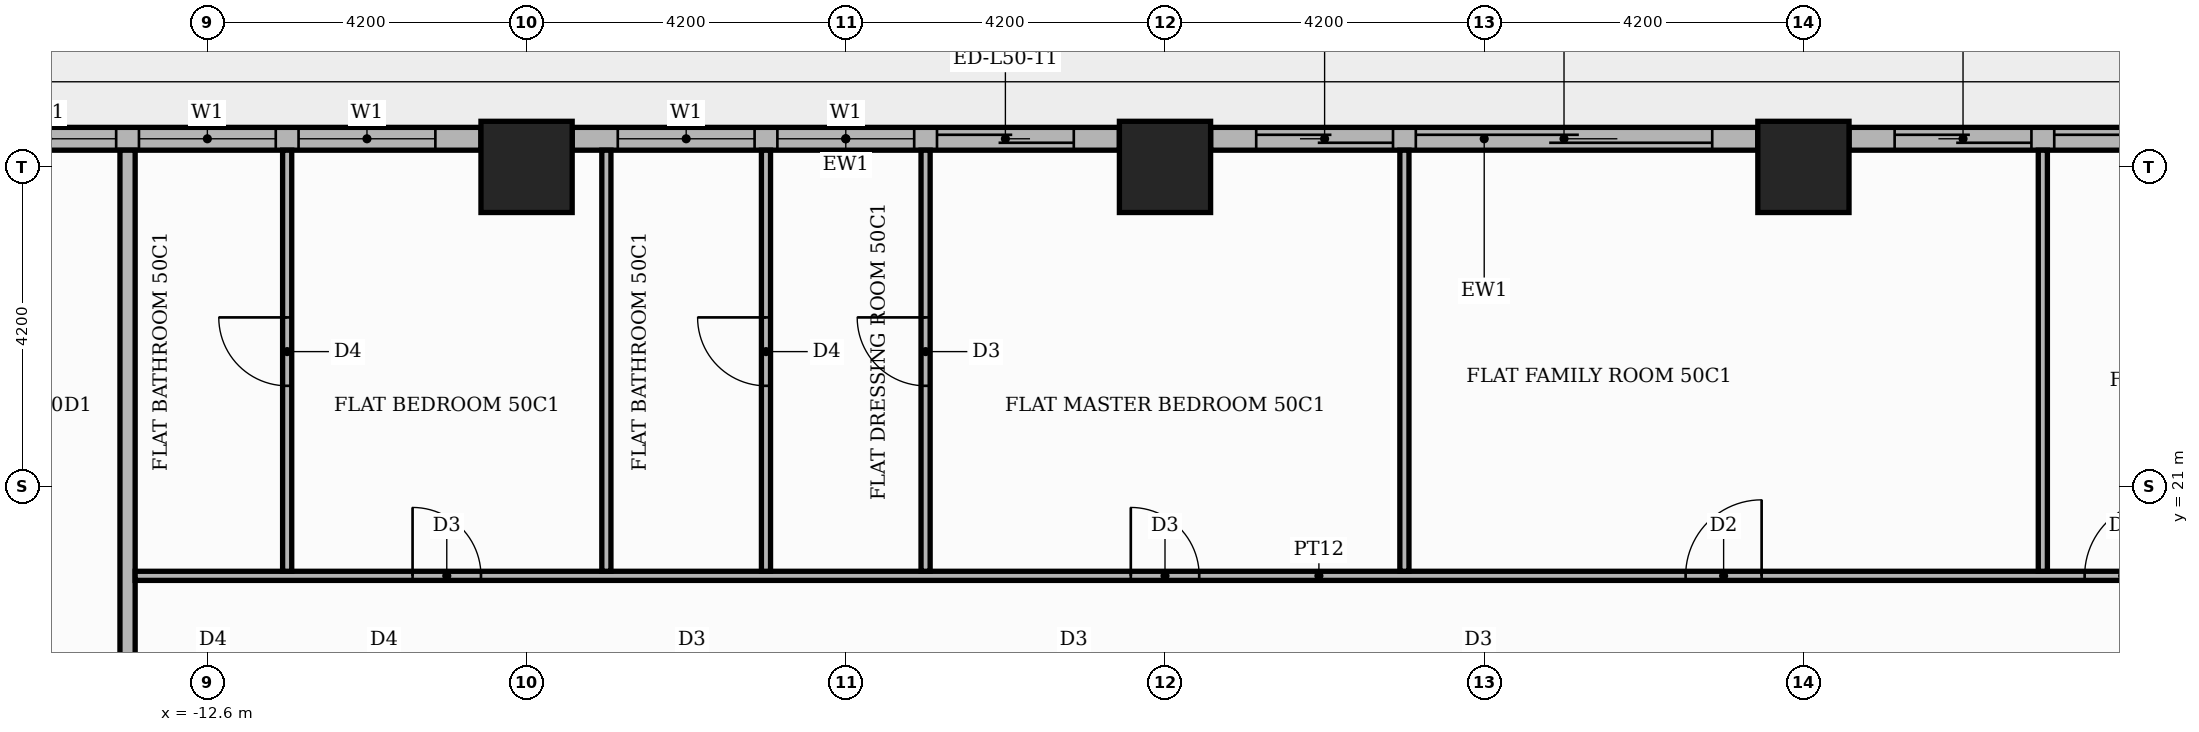
"""IFC4 building model, lengths in metres.
Left out: names, types, materials, properties, quantities, classifications, styles, units other than length and angle.
Written with IfcOpenShell. Run it as: python <this file> out.ifc"""

import sys

from ifc_helpers import new_model, si_unit, direction, frame, frame_2d, origin, origin_2d, place, context, subcontext, project, spatial, rectangle, extrude, element, fill, save


model = new_model("IFC4")
c1 = context("Model", 3, precision=1e-05, world=origin(), true_north=direction((0.0, 1.0)))
c2 = subcontext(c1, "Body", "Model", "MODEL_VIEW")
j1 = project(units=[si_unit("LENGTHUNIT", "METRE"), si_unit("PLANEANGLEUNIT", "RADIAN")], contexts=[c1])
p1 = place(None, origin())
s1 = spatial("IfcSite", under=j1, at=p1, CompositionType="ELEMENT")
p2 = place(p1, origin())
s2 = spatial("IfcBuilding", under=s1, at=p2, CompositionType="ELEMENT")
p3 = place(p2, frame((0.0, 0.0, 211.8)))
s3 = spatial("IfcBuildingStorey", under=s2, at=p3, CompositionType="ELEMENT", Elevation=211.8)
for number, where, z_axis, x_axis in (
    (1, (0.0, 25.2, 0.0), (0.0, 0.0, 1.0), (1.0, 0.0, 0.0)),
    (2, (-8.4, 25.2, 0.0), (0.0, 0.0, 1.0), (1.0, 0.0, 0.0)),
    (3, (8.4, 25.2, 0.0), (0.0, 0.0, 1.0), (1.0, 0.0, 0.0)),
):
    element("IfcColumn", number, at=place(p3, frame(where, z_axis=z_axis, x_axis=x_axis)), inside=s3, PredefinedType="COLUMN", context=c2, shape_type="SweptSolid", body=[
        extrude(rectangle(XDim=1.2, YDim=1.2, at=origin_2d()), origin(), (0.0, 0.0, 1.0), 3.9),
    ])
p4 = place(p3, frame((16.2, 25.57, 0.0), z_axis=(0.0, 0.0, 1.0), x_axis=(-1.0, 0.0, 0.0)))
e4 = element("IfcWall", 4, at=p4, inside=s3, PredefinedType="STANDARD", context=c2, shape_type="SweptSolid", body=[
    extrude(rectangle(XDim=7.2, YDim=0.3, at=frame_2d((3.6, 0.0))), origin(), (0.0, 0.0, 1.0), 3.48),
])
p5 = place(p4, frame((0.6, 0.0, 0.0)))
e5 = element("IfcOpeningElement", 5, at=p5, cuts=e4, PredefinedType="OPENING", context=c2, shape_type="SweptSolid", body=[
    extrude(rectangle(XDim=3.9, YDim=2.4, at=frame_2d((1.95, 1.2))), frame((0.0, 0.16, 0.0), z_axis=(0.0, -1.0, 0.0), x_axis=(1.0, 0.0, 0.0)), (0.0, 0.0, 1.0), 0.32),
])
p6 = place(p4, frame((4.8, 0.0, 0.0)))
e6 = element("IfcOpeningElement", 6, at=p6, cuts=e4, PredefinedType="OPENING", context=c2, shape_type="SweptSolid", body=[
    extrude(rectangle(XDim=1.8, YDim=2.4, at=frame_2d((0.9, 1.2))), frame((0.0, 0.16, 0.0), z_axis=(0.0, -1.0, 0.0), x_axis=(1.0, 0.0, 0.0)), (0.0, 0.0, 1.0), 0.32),
])
p7 = place(p3, frame((7.8, 25.57, 0.0), z_axis=(0.0, 0.0, 1.0), x_axis=(-1.0, 0.0, 0.0)))
e7 = element("IfcWall", 7, at=p7, inside=s3, PredefinedType="STANDARD", context=c2, shape_type="SweptSolid", body=[
    extrude(rectangle(XDim=7.2, YDim=0.3, at=frame_2d((3.6, 0.0))), origin(), (0.0, 0.0, 1.0), 3.48),
])
p8 = place(p7, frame((0.6, 0.0, 0.0)))
e8 = element("IfcOpeningElement", 8, at=p8, cuts=e7, PredefinedType="OPENING", context=c2, shape_type="SweptSolid", body=[
    extrude(rectangle(XDim=3.9, YDim=2.4, at=frame_2d((1.95, 1.2))), frame((0.0, 0.16, 0.0), z_axis=(0.0, -1.0, 0.0), x_axis=(1.0, 0.0, 0.0)), (0.0, 0.0, 1.0), 0.32),
])
p9 = place(p7, frame((4.8, 0.0, 0.0)))
e9 = element("IfcOpeningElement", 9, at=p9, cuts=e7, PredefinedType="OPENING", context=c2, shape_type="SweptSolid", body=[
    extrude(rectangle(XDim=1.8, YDim=2.4, at=frame_2d((0.9, 1.2))), frame((0.0, 0.16, 0.0), z_axis=(0.0, -1.0, 0.0), x_axis=(1.0, 0.0, 0.0)), (0.0, 0.0, 1.0), 0.32),
])
p10 = place(p3, frame((-0.6, 25.57, 0.0), z_axis=(0.0, 0.0, 1.0), x_axis=(-1.0, 0.0, 0.0)))
e10 = element("IfcWall", 10, at=p10, inside=s3, PredefinedType="STANDARD", context=c2, shape_type="SweptSolid", body=[
    extrude(rectangle(XDim=7.2, YDim=0.3, at=frame_2d((3.6, 0.0))), origin(), (0.0, 0.0, 1.0), 3.48),
])
p11 = place(p10, frame((0.6, 0.0, 0.0)))
e11 = element("IfcOpeningElement", 11, at=p11, cuts=e10, PredefinedType="OPENING", context=c2, shape_type="SweptSolid", body=[
    extrude(rectangle(XDim=1.8, YDim=2.4, at=frame_2d((0.9, 1.2))), frame((0.0, 0.16, 0.0), z_axis=(0.0, -1.0, 0.0), x_axis=(1.0, 0.0, 0.0)), (0.0, 0.0, 1.0), 0.32),
])
p12 = place(p10, frame((2.7, 0.0, 0.9)))
e12 = element("IfcOpeningElement", 12, at=p12, cuts=e10, PredefinedType="OPENING", context=c2, shape_type="SweptSolid", body=[
    extrude(rectangle(XDim=1.8, YDim=2.1, at=frame_2d((0.9, 1.05))), frame((0.0, 0.16, 0.0), z_axis=(0.0, -1.0, 0.0), x_axis=(1.0, 0.0, 0.0)), (0.0, 0.0, 1.0), 0.32),
])
p13 = place(p10, frame((4.8, 0.0, 0.9)))
e13 = element("IfcOpeningElement", 13, at=p13, cuts=e10, PredefinedType="OPENING", context=c2, shape_type="SweptSolid", body=[
    extrude(rectangle(XDim=1.8, YDim=2.1, at=frame_2d((0.9, 1.05))), frame((0.0, 0.16, 0.0), z_axis=(0.0, -1.0, 0.0), x_axis=(1.0, 0.0, 0.0)), (0.0, 0.0, 1.0), 0.32),
])
p14 = place(p3, frame((-9.0, 25.57, 0.0), z_axis=(0.0, 0.0, 1.0), x_axis=(-1.0, 0.0, 0.0)))
e14 = element("IfcWall", 14, at=p14, inside=s3, PredefinedType="STANDARD", context=c2, shape_type="SweptSolid", body=[
    extrude(rectangle(XDim=7.2, YDim=0.3, at=frame_2d((3.6, 0.0))), origin(), (0.0, 0.0, 1.0), 3.48),
])
p15 = place(p14, frame((0.6, 0.0, 0.9)))
e15 = element("IfcOpeningElement", 15, at=p15, cuts=e14, PredefinedType="OPENING", context=c2, shape_type="SweptSolid", body=[
    extrude(rectangle(XDim=1.8, YDim=2.1, at=frame_2d((0.9, 1.05))), frame((0.0, 0.16, 0.0), z_axis=(0.0, -1.0, 0.0), x_axis=(1.0, 0.0, 0.0)), (0.0, 0.0, 1.0), 0.32),
])
p16 = place(p14, frame((2.7, 0.0, 0.9)))
e16 = element("IfcOpeningElement", 16, at=p16, cuts=e14, PredefinedType="OPENING", context=c2, shape_type="SweptSolid", body=[
    extrude(rectangle(XDim=1.8, YDim=2.1, at=frame_2d((0.9, 1.05))), frame((0.0, 0.16, 0.0), z_axis=(0.0, -1.0, 0.0), x_axis=(1.0, 0.0, 0.0)), (0.0, 0.0, 1.0), 0.32),
])
p17 = place(p14, frame((4.8, 0.0, 0.9)))
e17 = element("IfcOpeningElement", 17, at=p17, cuts=e14, PredefinedType="OPENING", context=c2, shape_type="SweptSolid", body=[
    extrude(rectangle(XDim=1.8, YDim=2.1, at=frame_2d((0.9, 1.05))), frame((0.0, 0.16, 0.0), z_axis=(0.0, -1.0, 0.0), x_axis=(1.0, 0.0, 0.0)), (0.0, 0.0, 1.0), 0.32),
])
p18 = place(p3, frame((-13.65, 13.75, 0.0), z_axis=(0.0, 0.0, 1.0), x_axis=(0.0, 1.0, 0.0)))
e18 = element("IfcWall", 18, at=p18, inside=s3, PredefinedType="PARTITIONING", context=c2, shape_type="SweptSolid", body=[
    extrude(rectangle(XDim=11.67, YDim=0.2, at=frame_2d((5.835, 0.0))), origin(), (0.0, 0.0, 1.0), 3.48),
])
p19 = place(p3, frame((-13.55, 19.82, 0.0), z_axis=(0.0, 0.0, 1.0), x_axis=(1.0, 0.0, 0.0)))
e19 = element("IfcWall", 19, at=p19, inside=s3, PredefinedType="PARTITIONING", context=c2, shape_type="SweptSolid", body=[
    extrude(rectangle(XDim=31.15, YDim=0.12, at=frame_2d((15.575, 0.0))), origin(), (0.0, 0.0, 1.0), 3.48),
])
p20 = place(p19, frame((25.65, 0.0, 0.0)))
e20 = element("IfcOpeningElement", 20, at=p20, cuts=e19, PredefinedType="OPENING", context=c2, shape_type="SweptSolid", body=[
    extrude(rectangle(XDim=1.0, YDim=2.1, at=frame_2d((0.5, 1.05))), frame((0.0, 0.07, 0.0), z_axis=(0.0, -1.0, 0.0), x_axis=(1.0, 0.0, 0.0)), (0.0, 0.0, 1.0), 0.14),
])
p21 = place(p19, frame((20.4, 0.0, 0.0)))
e21 = element("IfcOpeningElement", 21, at=p21, cuts=e19, PredefinedType="OPENING", context=c2, shape_type="SweptSolid", body=[
    extrude(rectangle(XDim=1.0, YDim=2.1, at=frame_2d((0.5, 1.05))), frame((0.0, 0.07, 0.0), z_axis=(0.0, -1.0, 0.0), x_axis=(1.0, 0.0, 0.0)), (0.0, 0.0, 1.0), 0.14),
])
p22 = place(p19, frame((13.1, 0.0, 0.0)))
e22 = element("IfcOpeningElement", 22, at=p22, cuts=e19, PredefinedType="OPENING", context=c2, shape_type="SweptSolid", body=[
    extrude(rectangle(XDim=0.9, YDim=2.1, at=frame_2d((0.45, 1.05))), frame((0.0, 0.07, 0.0), z_axis=(0.0, -1.0, 0.0), x_axis=(1.0, 0.0, 0.0)), (0.0, 0.0, 1.0), 0.14),
])
p23 = place(p19, frame((3.65, 0.0, 0.0)))
e23 = element("IfcOpeningElement", 23, at=p23, cuts=e19, PredefinedType="OPENING", context=c2, shape_type="SweptSolid", body=[
    extrude(rectangle(XDim=0.9, YDim=2.1, at=frame_2d((0.45, 1.05))), frame((0.0, 0.07, 0.0), z_axis=(0.0, -1.0, 0.0), x_axis=(1.0, 0.0, 0.0)), (0.0, 0.0, 1.0), 0.14),
])
p24 = place(p3, frame((-11.55, 19.88, 0.0), z_axis=(0.0, 0.0, 1.0), x_axis=(0.0, 1.0, 0.0)))
e24 = element("IfcWall", 24, at=p24, inside=s3, PredefinedType="PARTITIONING", context=c2, shape_type="SweptSolid", body=[
    extrude(rectangle(XDim=5.54, YDim=0.12, at=frame_2d((2.77, 0.0))), origin(), (0.0, 0.0, 1.0), 3.48),
])
p25 = place(p24, frame((2.44, 0.0, 0.0)))
e25 = element("IfcOpeningElement", 25, at=p25, cuts=e24, PredefinedType="OPENING", context=c2, shape_type="SweptSolid", body=[
    extrude(rectangle(XDim=0.9, YDim=2.1, at=frame_2d((0.45, 1.05))), frame((0.0, 0.07, 0.0), z_axis=(0.0, -1.0, 0.0), x_axis=(1.0, 0.0, 0.0)), (0.0, 0.0, 1.0), 0.14),
])
p26 = place(p3, frame((-7.35, 19.88, 0.0), z_axis=(0.0, 0.0, 1.0), x_axis=(0.0, 1.0, 0.0)))
e26 = element("IfcWall", 26, at=p26, inside=s3, PredefinedType="PARTITIONING", context=c2, shape_type="SweptSolid", body=[
    extrude(rectangle(XDim=5.54, YDim=0.12, at=frame_2d((2.77, 0.0))), origin(), (0.0, 0.0, 1.0), 3.48),
])
p27 = place(p3, frame((-5.25, 19.88, 0.0), z_axis=(0.0, 0.0, 1.0), x_axis=(0.0, 1.0, 0.0)))
e27 = element("IfcWall", 27, at=p27, inside=s3, PredefinedType="PARTITIONING", context=c2, shape_type="SweptSolid", body=[
    extrude(rectangle(XDim=5.54, YDim=0.12, at=frame_2d((2.77, 0.0))), origin(), (0.0, 0.0, 1.0), 3.48),
])
p28 = place(p27, frame((2.44, 0.0, 0.0)))
e28 = element("IfcOpeningElement", 28, at=p28, cuts=e27, PredefinedType="OPENING", context=c2, shape_type="SweptSolid", body=[
    extrude(rectangle(XDim=0.9, YDim=2.1, at=frame_2d((0.45, 1.05))), frame((0.0, 0.07, 0.0), z_axis=(0.0, -1.0, 0.0), x_axis=(1.0, 0.0, 0.0)), (0.0, 0.0, 1.0), 0.14),
])
p29 = place(p3, frame((-3.15, 19.88, 0.0), z_axis=(0.0, 0.0, 1.0), x_axis=(0.0, 1.0, 0.0)))
e29 = element("IfcWall", 29, at=p29, inside=s3, PredefinedType="PARTITIONING", context=c2, shape_type="SweptSolid", body=[
    extrude(rectangle(XDim=5.54, YDim=0.12, at=frame_2d((2.77, 0.0))), origin(), (0.0, 0.0, 1.0), 3.48),
])
p30 = place(p29, frame((2.44, 0.0, 0.0)))
e30 = element("IfcOpeningElement", 30, at=p30, cuts=e29, PredefinedType="OPENING", context=c2, shape_type="SweptSolid", body=[
    extrude(rectangle(XDim=0.9, YDim=2.1, at=frame_2d((0.45, 1.05))), frame((0.0, 0.07, 0.0), z_axis=(0.0, -1.0, 0.0), x_axis=(1.0, 0.0, 0.0)), (0.0, 0.0, 1.0), 0.14),
])
for number, where, z_axis, x_axis in (
    (31, (3.15, 19.88, 0.0), (0.0, 0.0, 1.0), (0.0, 1.0, 0.0)),
    (32, (11.55, 19.88, 0.0), (0.0, 0.0, 1.0), (0.0, 1.0, 0.0)),
):
    element("IfcWall", number, at=place(p3, frame(where, z_axis=z_axis, x_axis=x_axis)), inside=s3, PredefinedType="PARTITIONING", context=c2, shape_type="SweptSolid", body=[
        extrude(rectangle(XDim=5.54, YDim=0.12, at=frame_2d((2.77, 0.0))), origin(), (0.0, 0.0, 1.0), 3.48),
    ])
p31 = place(p5, origin())
e33 = element("IfcDoor", 33, at=p31, inside=s3, OperationType="SLIDING_TO_LEFT", PredefinedType="DOOR", context=c2, shape_type="SweptSolid", body=[
    extrude(rectangle(XDim=3.9, YDim=2.4, at=frame_2d((1.95, 1.2))), frame((0.0, 0.025, 0.0), z_axis=(0.0, -1.0, 0.0), x_axis=(1.0, 0.0, 0.0)), (0.0, 0.0, 1.0), 0.05),
])
fill(e5, e33)
p32 = place(p6, origin())
e34 = element("IfcDoor", 34, at=p32, inside=s3, OperationType="SLIDING_TO_RIGHT", PredefinedType="DOOR", context=c2, shape_type="SweptSolid", body=[
    extrude(rectangle(XDim=1.8, YDim=2.4, at=frame_2d((0.9, 1.2))), frame((0.0, 0.025, 0.0), z_axis=(0.0, -1.0, 0.0), x_axis=(1.0, 0.0, 0.0)), (0.0, 0.0, 1.0), 0.05),
])
fill(e6, e34)
p33 = place(p8, origin())
e35 = element("IfcDoor", 35, at=p33, inside=s3, OperationType="SLIDING_TO_LEFT", PredefinedType="DOOR", context=c2, shape_type="SweptSolid", body=[
    extrude(rectangle(XDim=3.9, YDim=2.4, at=frame_2d((1.95, 1.2))), frame((0.0, 0.025, 0.0), z_axis=(0.0, -1.0, 0.0), x_axis=(1.0, 0.0, 0.0)), (0.0, 0.0, 1.0), 0.05),
])
fill(e8, e35)
p34 = place(p9, origin())
e36 = element("IfcDoor", 36, at=p34, inside=s3, OperationType="SLIDING_TO_RIGHT", PredefinedType="DOOR", context=c2, shape_type="SweptSolid", body=[
    extrude(rectangle(XDim=1.8, YDim=2.4, at=frame_2d((0.9, 1.2))), frame((0.0, 0.025, 0.0), z_axis=(0.0, -1.0, 0.0), x_axis=(1.0, 0.0, 0.0)), (0.0, 0.0, 1.0), 0.05),
])
fill(e9, e36)
p35 = place(p11, origin())
e37 = element("IfcDoor", 37, at=p35, inside=s3, OperationType="SLIDING_TO_LEFT", PredefinedType="DOOR", context=c2, shape_type="SweptSolid", body=[
    extrude(rectangle(XDim=1.8, YDim=2.4, at=frame_2d((0.9, 1.2))), frame((0.0, 0.025, 0.0), z_axis=(0.0, -1.0, 0.0), x_axis=(1.0, 0.0, 0.0)), (0.0, 0.0, 1.0), 0.05),
])
fill(e11, e37)
p36 = place(p12, origin())
e38 = element("IfcWindow", 38, at=p36, inside=s3, PartitioningType="SINGLE_PANEL", PredefinedType="WINDOW", context=c2, shape_type="SweptSolid", body=[
    extrude(rectangle(XDim=1.8, YDim=2.1, at=frame_2d((0.9, 1.05))), frame((0.0, 0.03, 0.0), z_axis=(0.0, -1.0, 0.0), x_axis=(1.0, 0.0, 0.0)), (0.0, 0.0, 1.0), 0.06),
])
fill(e12, e38)
p37 = place(p13, origin())
e39 = element("IfcWindow", 39, at=p37, inside=s3, PartitioningType="SINGLE_PANEL", PredefinedType="WINDOW", context=c2, shape_type="SweptSolid", body=[
    extrude(rectangle(XDim=1.8, YDim=2.1, at=frame_2d((0.9, 1.05))), frame((0.0, 0.03, 0.0), z_axis=(0.0, -1.0, 0.0), x_axis=(1.0, 0.0, 0.0)), (0.0, 0.0, 1.0), 0.06),
])
fill(e13, e39)
p38 = place(p15, origin())
e40 = element("IfcWindow", 40, at=p38, inside=s3, PartitioningType="SINGLE_PANEL", PredefinedType="WINDOW", context=c2, shape_type="SweptSolid", body=[
    extrude(rectangle(XDim=1.8, YDim=2.1, at=frame_2d((0.9, 1.05))), frame((0.0, 0.03, 0.0), z_axis=(0.0, -1.0, 0.0), x_axis=(1.0, 0.0, 0.0)), (0.0, 0.0, 1.0), 0.06),
])
fill(e15, e40)
p39 = place(p16, origin())
e41 = element("IfcWindow", 41, at=p39, inside=s3, PartitioningType="SINGLE_PANEL", PredefinedType="WINDOW", context=c2, shape_type="SweptSolid", body=[
    extrude(rectangle(XDim=1.8, YDim=2.1, at=frame_2d((0.9, 1.05))), frame((0.0, 0.03, 0.0), z_axis=(0.0, -1.0, 0.0), x_axis=(1.0, 0.0, 0.0)), (0.0, 0.0, 1.0), 0.06),
])
fill(e16, e41)
p40 = place(p17, origin())
e42 = element("IfcWindow", 42, at=p40, inside=s3, PartitioningType="SINGLE_PANEL", PredefinedType="WINDOW", context=c2, shape_type="SweptSolid", body=[
    extrude(rectangle(XDim=1.8, YDim=2.1, at=frame_2d((0.9, 1.05))), frame((0.0, 0.03, 0.0), z_axis=(0.0, -1.0, 0.0), x_axis=(1.0, 0.0, 0.0)), (0.0, 0.0, 1.0), 0.06),
])
fill(e17, e42)
p41 = place(p20, origin())
e43 = element("IfcDoor", 43, at=p41, inside=s3, OperationType="SINGLE_SWING_RIGHT", PredefinedType="DOOR", context=c2, shape_type="SweptSolid", body=[
    extrude(rectangle(XDim=1.0, YDim=2.1, at=frame_2d((0.5, 1.05))), frame((0.0, 0.025, 0.0), z_axis=(0.0, -1.0, 0.0), x_axis=(1.0, 0.0, 0.0)), (0.0, 0.0, 1.0), 0.05),
])
fill(e20, e43)
p42 = place(p21, origin())
e44 = element("IfcDoor", 44, at=p42, inside=s3, OperationType="SINGLE_SWING_RIGHT", PredefinedType="DOOR", context=c2, shape_type="SweptSolid", body=[
    extrude(rectangle(XDim=1.0, YDim=2.1, at=frame_2d((0.5, 1.05))), frame((0.0, 0.025, 0.0), z_axis=(0.0, -1.0, 0.0), x_axis=(1.0, 0.0, 0.0)), (0.0, 0.0, 1.0), 0.05),
])
fill(e21, e44)
p43 = place(p22, origin())
e45 = element("IfcDoor", 45, at=p43, inside=s3, OperationType="SINGLE_SWING_LEFT", PredefinedType="DOOR", context=c2, shape_type="SweptSolid", body=[
    extrude(rectangle(XDim=0.9, YDim=2.1, at=frame_2d((0.45, 1.05))), frame((0.0, 0.025, 0.0), z_axis=(0.0, -1.0, 0.0), x_axis=(1.0, 0.0, 0.0)), (0.0, 0.0, 1.0), 0.05),
])
fill(e22, e45)
p44 = place(p30, origin())
e46 = element("IfcDoor", 46, at=p44, inside=s3, OperationType="SINGLE_SWING_RIGHT", PredefinedType="DOOR", context=c2, shape_type="SweptSolid", body=[
    extrude(rectangle(XDim=0.9, YDim=2.1, at=frame_2d((0.45, 1.05))), frame((0.0, 0.025, 0.0), z_axis=(0.0, -1.0, 0.0), x_axis=(1.0, 0.0, 0.0)), (0.0, 0.0, 1.0), 0.05),
])
fill(e30, e46)
p45 = place(p28, origin())
e47 = element("IfcDoor", 47, at=p45, inside=s3, OperationType="SINGLE_SWING_RIGHT", PredefinedType="DOOR", context=c2, shape_type="SweptSolid", body=[
    extrude(rectangle(XDim=0.9, YDim=2.1, at=frame_2d((0.45, 1.05))), frame((0.0, 0.025, 0.0), z_axis=(0.0, -1.0, 0.0), x_axis=(1.0, 0.0, 0.0)), (0.0, 0.0, 1.0), 0.05),
])
fill(e28, e47)
p46 = place(p23, origin())
e48 = element("IfcDoor", 48, at=p46, inside=s3, OperationType="SINGLE_SWING_LEFT", PredefinedType="DOOR", context=c2, shape_type="SweptSolid", body=[
    extrude(rectangle(XDim=0.9, YDim=2.1, at=frame_2d((0.45, 1.05))), frame((0.0, 0.025, 0.0), z_axis=(0.0, -1.0, 0.0), x_axis=(1.0, 0.0, 0.0)), (0.0, 0.0, 1.0), 0.05),
])
fill(e23, e48)
p47 = place(p25, origin())
e49 = element("IfcDoor", 49, at=p47, inside=s3, OperationType="SINGLE_SWING_RIGHT", PredefinedType="DOOR", context=c2, shape_type="SweptSolid", body=[
    extrude(rectangle(XDim=0.9, YDim=2.1, at=frame_2d((0.45, 1.05))), frame((0.0, 0.025, 0.0), z_axis=(0.0, -1.0, 0.0), x_axis=(1.0, 0.0, 0.0)), (0.0, 0.0, 1.0), 0.05),
])
fill(e25, e49)
save(model, sys.argv[1])
